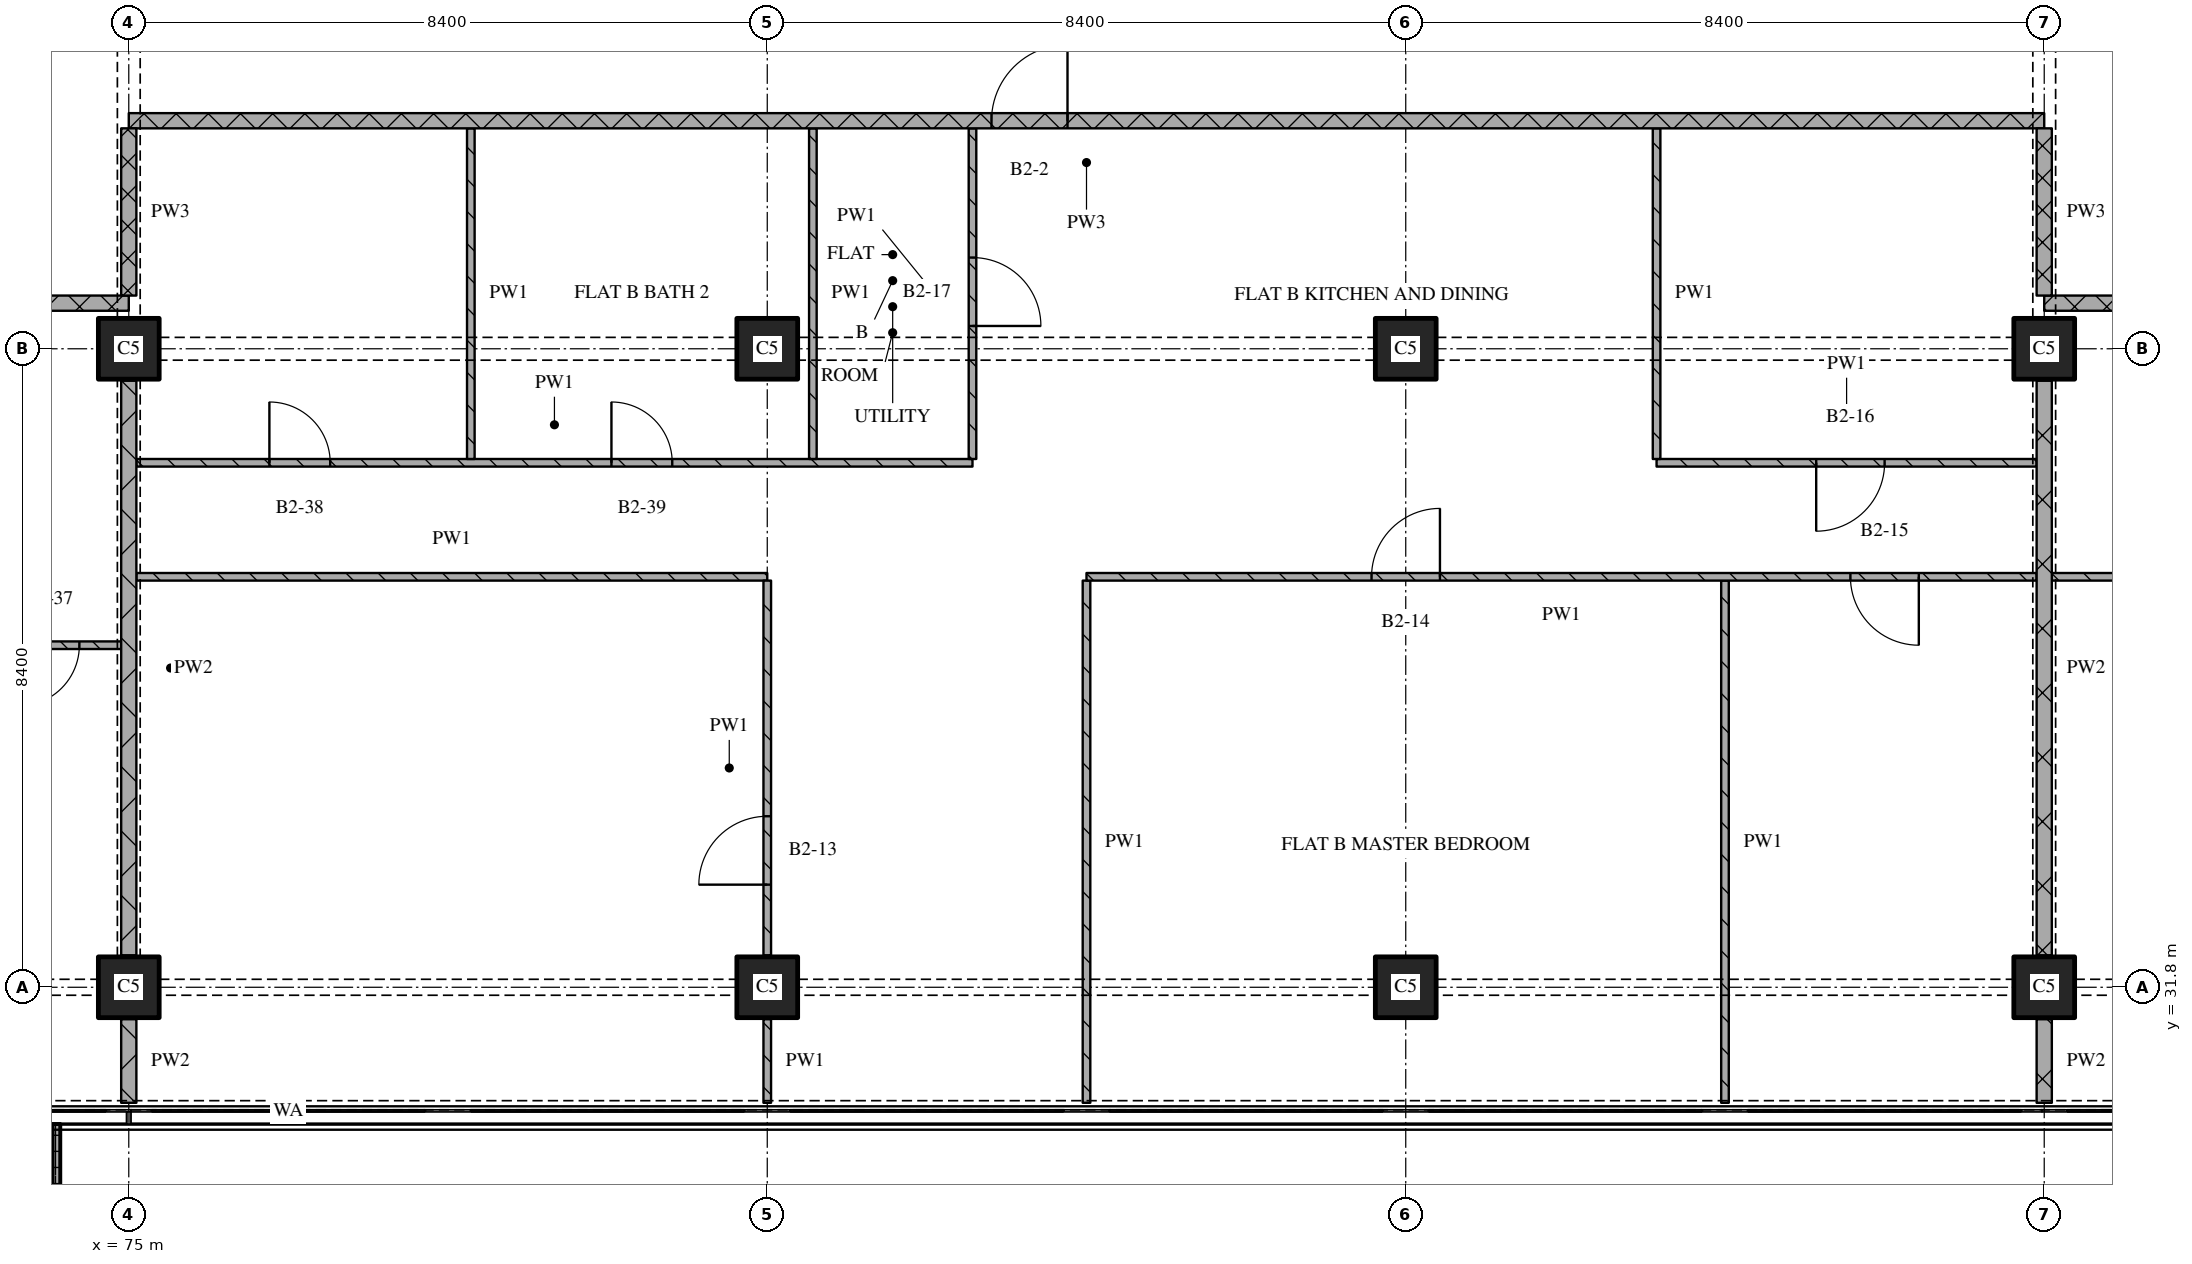
"""IFC4 building model, lengths in metres.
Left out: names, types, materials, properties, quantities, classifications, styles, units other than length and angle.
Written with IfcOpenShell. Run it as: python <this file> out.ifc"""

import sys

from ifc_helpers import new_model, si_unit, direction, frame, frame_2d, origin, origin_2d, place, context, subcontext, project, spatial, polyline, rectangle, outline, extrude, element, fill, save


model = new_model("IFC4")
c1 = context("Model", 3, precision=1e-05, world=origin(), true_north=direction((0.0, 1.0)))
c2 = subcontext(c1, "Body", "Model", "MODEL_VIEW")
j1 = project(units=[si_unit("LENGTHUNIT", "METRE"), si_unit("PLANEANGLEUNIT", "RADIAN")], contexts=[c1])
p1 = place(None, origin())
s1 = spatial("IfcSite", under=j1, at=p1, CompositionType="ELEMENT")
p2 = place(p1, origin())
s2 = spatial("IfcBuilding", under=s1, at=p2, CompositionType="ELEMENT")
p3 = place(p2, frame((0.0, 0.0, 109.65)))
s3 = spatial("IfcBuildingStorey", under=s2, at=p3, CompositionType="ELEMENT", Elevation=109.65)
for number, where, z_axis, x_axis in (
    (1, (75.0, 31.8, 0.0), (0.0, 0.0, 1.0), (1.0, 0.0, 0.0)),
    (2, (75.0, 40.2, 0.0), (0.0, 0.0, 1.0), (1.0, 0.0, 0.0)),
    (3, (83.4, 31.8, 0.0), (0.0, 0.0, 1.0), (1.0, 0.0, 0.0)),
    (4, (83.4, 40.2, 0.0), (0.0, 0.0, 1.0), (1.0, 0.0, 0.0)),
    (5, (91.8, 31.8, 0.0), (0.0, 0.0, 1.0), (1.0, 0.0, 0.0)),
    (6, (91.8, 40.2, 0.0), (0.0, 0.0, 1.0), (1.0, 0.0, 0.0)),
    (7, (100.2, 31.8, 0.0), (0.0, 0.0, 1.0), (1.0, 0.0, 0.0)),
    (8, (100.2, 40.2, 0.0), (0.0, 0.0, 1.0), (1.0, 0.0, 0.0)),
):
    element("IfcColumn", number, at=place(p3, frame(where, z_axis=z_axis, x_axis=x_axis)), inside=s3, PredefinedType="COLUMN", context=c2, shape_type="SweptSolid", body=[
        extrude(rectangle(XDim=0.8, YDim=0.8, at=origin_2d()), origin(), (0.0, 0.0, 1.0), 3.6),
    ])
p4 = place(p3, origin())
e9 = element("IfcWall", 9, at=p4, inside=s3, PredefinedType="SOLIDWALL", context=c2, shape_type="SweptSolid", body=[
    extrude(outline(polyline([(71.7, 30.0), (71.8, 30.0), (71.8, 28.5), (74.0, 28.5), (74.0, 30.0), (74.1, 30.0), (74.1, 28.4), (71.7, 28.4), (71.7, 30.0)])), origin(), (0.0, 0.0, 1.0), 1.0),
])
p5 = place(p3, frame((68.4, 36.3, 0.0), z_axis=(0.0, 0.0, 1.0), x_axis=(1.0, 0.0, 0.0)))
e10 = element("IfcWall", 10, at=p5, inside=s3, PredefinedType="PARTITIONING", context=c2, shape_type="SweptSolid", body=[
    extrude(rectangle(XDim=6.5, YDim=0.1, at=frame_2d((3.25, 0.0))), origin(), (0.0, 0.0, 1.0), 3.32),
])
p6 = place(p5, frame((5.15, 0.0, 0.0)))
e11 = element("IfcOpeningElement", 11, at=p6, cuts=e10, PredefinedType="OPENING", context=c2, shape_type="SweptSolid", body=[
    extrude(rectangle(XDim=0.8, YDim=2.1, at=frame_2d((0.4, 1.05))), frame((0.0, 0.06, 0.0), z_axis=(0.0, -1.0, 0.0), x_axis=(1.0, 0.0, 0.0)), (0.0, 0.0, 1.0), 0.12),
])
p7 = place(p3, frame((75.1, 37.2, 0.0), z_axis=(0.0, 0.0, 1.0), x_axis=(1.0, 0.0, 0.0)))
e12 = element("IfcWall", 12, at=p7, inside=s3, PredefinedType="PARTITIONING", context=c2, shape_type="SweptSolid", body=[
    extrude(rectangle(XDim=8.3, YDim=0.1, at=frame_2d((4.15, 0.0))), origin(), (0.0, 0.0, 1.0), 3.32),
])
p8 = place(p3, frame((75.1, 38.7, 0.0), z_axis=(0.0, 0.0, 1.0), x_axis=(1.0, 0.0, 0.0)))
e13 = element("IfcWall", 13, at=p8, inside=s3, PredefinedType="PARTITIONING", context=c2, shape_type="SweptSolid", body=[
    extrude(rectangle(XDim=11.0, YDim=0.1, at=frame_2d((5.5, 0.0))), origin(), (0.0, 0.0, 1.0), 3.32),
])
p9 = place(p8, frame((1.75, 0.0, 0.0)))
e14 = element("IfcOpeningElement", 14, at=p9, cuts=e13, PredefinedType="OPENING", context=c2, shape_type="SweptSolid", body=[
    extrude(rectangle(XDim=0.8, YDim=2.1, at=frame_2d((0.4, 1.05))), frame((0.0, 0.06, 0.0), z_axis=(0.0, -1.0, 0.0), x_axis=(1.0, 0.0, 0.0)), (0.0, 0.0, 1.0), 0.12),
])
p10 = place(p8, frame((6.25, 0.0, 0.0)))
e15 = element("IfcOpeningElement", 15, at=p10, cuts=e13, PredefinedType="OPENING", context=c2, shape_type="SweptSolid", body=[
    extrude(rectangle(XDim=0.8, YDim=2.1, at=frame_2d((0.4, 1.05))), frame((0.0, 0.06, 0.0), z_axis=(0.0, -1.0, 0.0), x_axis=(1.0, 0.0, 0.0)), (0.0, 0.0, 1.0), 0.12),
])
p11 = place(p3, frame((95.1, 38.7, 0.0), z_axis=(0.0, 0.0, 1.0), x_axis=(1.0, 0.0, 0.0)))
e16 = element("IfcWall", 16, at=p11, inside=s3, PredefinedType="PARTITIONING", context=c2, shape_type="SweptSolid", body=[
    extrude(rectangle(XDim=5.0, YDim=0.1, at=frame_2d((2.5, 0.0))), origin(), (0.0, 0.0, 1.0), 3.32),
])
p12 = place(p11, frame((2.1, 0.0, 0.0)))
e17 = element("IfcOpeningElement", 17, at=p12, cuts=e16, PredefinedType="OPENING", context=c2, shape_type="SweptSolid", body=[
    extrude(rectangle(XDim=0.9, YDim=2.1, at=frame_2d((0.45, 1.05))), frame((0.0, 0.06, 0.0), z_axis=(0.0, -1.0, 0.0), x_axis=(1.0, 0.0, 0.0)), (0.0, 0.0, 1.0), 0.12),
])
p13 = place(p3, frame((75.0, 40.8, 0.0), z_axis=(0.0, 0.0, 1.0), x_axis=(-1.0, 0.0, 0.0)))
e18 = element("IfcWall", 18, at=p13, inside=s3, PredefinedType="PARTITIONING", context=c2, shape_type="SweptSolid", body=[
    extrude(rectangle(XDim=24.18, YDim=0.2, at=frame_2d((12.09, 0.0))), origin(), (0.0, 0.0, 1.0), 3.32),
])
p14 = place(p13, frame((6.85, 0.0, 0.0)))
e19 = element("IfcOpeningElement", 19, at=p14, cuts=e18, PredefinedType="OPENING", context=c2, shape_type="SweptSolid", body=[
    extrude(rectangle(XDim=1.0, YDim=2.1, at=frame_2d((0.5, 1.05))), frame((0.0, 0.11, 0.0), z_axis=(0.0, -1.0, 0.0), x_axis=(1.0, 0.0, 0.0)), (0.0, 0.0, 1.0), 0.22),
])
p15 = place(p3, frame((124.38, 40.8, 0.0), z_axis=(0.0, 0.0, 1.0), x_axis=(-1.0, 0.0, 0.0)))
e20 = element("IfcWall", 20, at=p15, inside=s3, PredefinedType="PARTITIONING", context=c2, shape_type="SweptSolid", body=[
    extrude(rectangle(XDim=24.18, YDim=0.2, at=frame_2d((12.09, 0.0))), origin(), (0.0, 0.0, 1.0), 3.32),
])
p16 = place(p15, frame((12.13, 0.0, 0.0)))
e21 = element("IfcOpeningElement", 21, at=p16, cuts=e20, PredefinedType="OPENING", context=c2, shape_type="SweptSolid", body=[
    extrude(rectangle(XDim=1.0, YDim=2.1, at=frame_2d((0.5, 1.05))), frame((0.0, 0.11, 0.0), z_axis=(0.0, -1.0, 0.0), x_axis=(1.0, 0.0, 0.0)), (0.0, 0.0, 1.0), 0.22),
])
p17 = place(p3, frame((100.2, 43.2, 0.0), z_axis=(0.0, 0.0, 1.0), x_axis=(-1.0, 0.0, 0.0)))
e22 = element("IfcWall", 22, at=p17, inside=s3, PredefinedType="PARTITIONING", context=c2, shape_type="SweptSolid", body=[
    extrude(rectangle(XDim=25.2, YDim=0.2, at=frame_2d((12.6, 0.0))), origin(), (0.0, 0.0, 1.0), 3.32),
])
p18 = place(p17, frame((12.85, 0.0, 0.0)))
e23 = element("IfcOpeningElement", 23, at=p18, cuts=e22, PredefinedType="OPENING", context=c2, shape_type="SweptSolid", body=[
    extrude(rectangle(XDim=1.0, YDim=2.1, at=frame_2d((0.5, 1.05))), frame((0.0, 0.11, 0.0), z_axis=(0.0, -1.0, 0.0), x_axis=(1.0, 0.0, 0.0)), (0.0, 0.0, 1.0), 0.22),
])
p19 = place(p3, frame((75.0, 43.1, 0.0), z_axis=(0.0, 0.0, 1.0), x_axis=(0.0, -1.0, 0.0)))
e24 = element("IfcWall", 24, at=p19, inside=s3, PredefinedType="PARTITIONING", context=c2, shape_type="SweptSolid", body=[
    extrude(rectangle(XDim=2.2, YDim=0.2, at=frame_2d((1.1, 0.0))), origin(), (0.0, 0.0, 1.0), 2.43),
])
p20 = place(p3, frame((75.0, 31.38, 0.0), z_axis=(0.0, 0.0, 1.0), x_axis=(0.0, -1.0, 0.0)))
e25 = element("IfcWall", 25, at=p20, inside=s3, PredefinedType="PARTITIONING", context=c2, shape_type="SweptSolid", body=[
    extrude(rectangle(XDim=1.1, YDim=0.2, at=frame_2d((0.55, 0.0))), origin(), (0.0, 0.0, 1.0), 3.32),
])
p21 = place(p3, frame((75.0, 39.78, 0.0), z_axis=(0.0, 0.0, 1.0), x_axis=(0.0, -1.0, 0.0)))
e26 = element("IfcWall", 26, at=p21, inside=s3, PredefinedType="PARTITIONING", context=c2, shape_type="SweptSolid", body=[
    extrude(rectangle(XDim=7.56, YDim=0.2, at=frame_2d((3.78, 0.0))), origin(), (0.0, 0.0, 1.0), 2.83),
])
p22 = place(p3, frame((79.5, 43.1, 0.0), z_axis=(0.0, 0.0, 1.0), x_axis=(0.0, -1.0, 0.0)))
e27 = element("IfcWall", 27, at=p22, inside=s3, PredefinedType="PARTITIONING", context=c2, shape_type="SweptSolid", body=[
    extrude(rectangle(XDim=4.35, YDim=0.1, at=frame_2d((2.175, 0.0))), origin(), (0.0, 0.0, 1.0), 3.32),
])
p23 = place(p3, frame((83.4, 31.38, 0.0), z_axis=(0.0, 0.0, 1.0), x_axis=(0.0, -1.0, 0.0)))
e28 = element("IfcWall", 28, at=p23, inside=s3, PredefinedType="PARTITIONING", context=c2, shape_type="SweptSolid", body=[
    extrude(rectangle(XDim=1.1, YDim=0.1, at=frame_2d((0.55, 0.0))), origin(), (0.0, 0.0, 1.0), 3.32),
])
p24 = place(p3, frame((83.4, 32.22, 0.0), z_axis=(0.0, 0.0, 1.0), x_axis=(0.0, 1.0, 0.0)))
e29 = element("IfcWall", 29, at=p24, inside=s3, PredefinedType="PARTITIONING", context=c2, shape_type="SweptSolid", body=[
    extrude(rectangle(XDim=4.93, YDim=0.1, at=frame_2d((2.465, 0.0))), origin(), (0.0, 0.0, 1.0), 3.32),
])
p25 = place(p24, frame((0.93, 0.0, 0.0)))
e30 = element("IfcOpeningElement", 30, at=p25, cuts=e29, PredefinedType="OPENING", context=c2, shape_type="SweptSolid", body=[
    extrude(rectangle(XDim=0.9, YDim=2.1, at=frame_2d((0.45, 1.05))), frame((0.0, 0.06, 0.0), z_axis=(0.0, -1.0, 0.0), x_axis=(1.0, 0.0, 0.0)), (0.0, 0.0, 1.0), 0.12),
])
p26 = place(p3, frame((84.0, 43.1, 0.0), z_axis=(0.0, 0.0, 1.0), x_axis=(0.0, -1.0, 0.0)))
e31 = element("IfcWall", 31, at=p26, inside=s3, PredefinedType="PARTITIONING", context=c2, shape_type="SweptSolid", body=[
    extrude(rectangle(XDim=4.35, YDim=0.1, at=frame_2d((2.175, 0.0))), origin(), (0.0, 0.0, 1.0), 3.32),
])
p27 = place(p3, frame((86.1, 38.75, 0.0), z_axis=(0.0, 0.0, 1.0), x_axis=(0.0, 1.0, 0.0)))
e32 = element("IfcWall", 32, at=p27, inside=s3, PredefinedType="PARTITIONING", context=c2, shape_type="SweptSolid", body=[
    extrude(rectangle(XDim=4.35, YDim=0.1, at=frame_2d((2.175, 0.0))), origin(), (0.0, 0.0, 1.0), 3.32),
])
p28 = place(p27, frame((1.75, 0.0, 0.0)))
e33 = element("IfcOpeningElement", 33, at=p28, cuts=e32, PredefinedType="OPENING", context=c2, shape_type="SweptSolid", body=[
    extrude(rectangle(XDim=0.9, YDim=2.1, at=frame_2d((0.45, 1.05))), frame((0.0, 0.06, 0.0), z_axis=(0.0, -1.0, 0.0), x_axis=(1.0, 0.0, 0.0)), (0.0, 0.0, 1.0), 0.12),
])
p29 = place(p3, frame((87.6, 37.15, 0.0), z_axis=(0.0, 0.0, 1.0), x_axis=(0.0, -1.0, 0.0)))
e34 = element("IfcWall", 34, at=p29, inside=s3, PredefinedType="PARTITIONING", context=c2, shape_type="SweptSolid", body=[
    extrude(rectangle(XDim=6.87, YDim=0.1, at=frame_2d((3.435, 0.0))), origin(), (0.0, 0.0, 1.0), 3.32),
])
p30 = place(p3, frame((95.1, 43.1, 0.0), z_axis=(0.0, 0.0, 1.0), x_axis=(0.0, -1.0, 0.0)))
e35 = element("IfcWall", 35, at=p30, inside=s3, PredefinedType="PARTITIONING", context=c2, shape_type="SweptSolid", body=[
    extrude(rectangle(XDim=4.35, YDim=0.1, at=frame_2d((2.175, 0.0))), origin(), (0.0, 0.0, 1.0), 3.32),
])
p31 = place(p3, frame((96.0, 37.15, 0.0), z_axis=(0.0, 0.0, 1.0), x_axis=(0.0, -1.0, 0.0)))
e36 = element("IfcWall", 36, at=p31, inside=s3, PredefinedType="PARTITIONING", context=c2, shape_type="SweptSolid", body=[
    extrude(rectangle(XDim=6.87, YDim=0.1, at=frame_2d((3.435, 0.0))), origin(), (0.0, 0.0, 1.0), 3.32),
])
p32 = place(p3, frame((100.2, 43.1, 0.0), z_axis=(0.0, 0.0, 1.0), x_axis=(0.0, -1.0, 0.0)))
e37 = element("IfcWall", 37, at=p32, inside=s3, PredefinedType="PARTITIONING", context=c2, shape_type="SweptSolid", body=[
    extrude(rectangle(XDim=2.2, YDim=0.2, at=frame_2d((1.1, 0.0))), origin(), (0.0, 0.0, 1.0), 2.43),
])
p33 = place(p3, frame((100.2, 31.38, 0.0), z_axis=(0.0, 0.0, 1.0), x_axis=(0.0, -1.0, 0.0)))
e38 = element("IfcWall", 38, at=p33, inside=s3, PredefinedType="PARTITIONING", context=c2, shape_type="SweptSolid", body=[
    extrude(rectangle(XDim=1.1, YDim=0.2, at=frame_2d((0.55, 0.0))), origin(), (0.0, 0.0, 1.0), 3.32),
])
p34 = place(p3, frame((100.2, 39.78, 0.0), z_axis=(0.0, 0.0, 1.0), x_axis=(0.0, -1.0, 0.0)))
e39 = element("IfcWall", 39, at=p34, inside=s3, PredefinedType="PARTITIONING", context=c2, shape_type="SweptSolid", body=[
    extrude(rectangle(XDim=7.56, YDim=0.2, at=frame_2d((3.78, 0.0))), origin(), (0.0, 0.0, 1.0), 2.83),
])
p35 = place(p3, frame((100.1, 37.2, 0.0), z_axis=(0.0, 0.0, 1.0), x_axis=(-1.0, 0.0, 0.0)))
e40 = element("IfcWall", 40, at=p35, inside=s3, PredefinedType="PARTITIONING", context=c2, shape_type="SweptSolid", body=[
    extrude(rectangle(XDim=12.5, YDim=0.1, at=frame_2d((6.25, 0.0))), origin(), (0.0, 0.0, 1.0), 3.32),
])
p36 = place(p35, frame((1.55, 0.0, 0.0)))
e41 = element("IfcOpeningElement", 41, at=p36, cuts=e40, PredefinedType="OPENING", context=c2, shape_type="SweptSolid", body=[
    extrude(rectangle(XDim=0.9, YDim=2.1, at=frame_2d((0.45, 1.05))), frame((0.0, 0.06, 0.0), z_axis=(0.0, -1.0, 0.0), x_axis=(1.0, 0.0, 0.0)), (0.0, 0.0, 1.0), 0.12),
])
p37 = place(p35, frame((7.85, 0.0, 0.0)))
e42 = element("IfcOpeningElement", 42, at=p37, cuts=e40, PredefinedType="OPENING", context=c2, shape_type="SweptSolid", body=[
    extrude(rectangle(XDim=0.9, YDim=2.1, at=frame_2d((0.45, 1.05))), frame((0.0, 0.06, 0.0), z_axis=(0.0, -1.0, 0.0), x_axis=(1.0, 0.0, 0.0)), (0.0, 0.0, 1.0), 0.12),
])
p38 = place(p3, frame((100.3, 37.2, 0.0), z_axis=(0.0, 0.0, 1.0), x_axis=(1.0, 0.0, 0.0)))
e43 = element("IfcWall", 43, at=p38, inside=s3, PredefinedType="PARTITIONING", context=c2, shape_type="SweptSolid", body=[
    extrude(rectangle(XDim=10.7, YDim=0.1, at=frame_2d((5.35, 0.0))), origin(), (0.0, 0.0, 1.0), 3.32),
])
p39 = place(p38, frame((1.75, 0.0, 0.0)))
e44 = element("IfcOpeningElement", 44, at=p39, cuts=e43, PredefinedType="OPENING", context=c2, shape_type="SweptSolid", body=[
    extrude(rectangle(XDim=0.8, YDim=2.1, at=frame_2d((0.4, 1.05))), frame((0.0, 0.06, 0.0), z_axis=(0.0, -1.0, 0.0), x_axis=(1.0, 0.0, 0.0)), (0.0, 0.0, 1.0), 0.12),
])
p40 = place(p38, frame((6.25, 0.0, 0.0)))
e45 = element("IfcOpeningElement", 45, at=p40, cuts=e43, PredefinedType="OPENING", context=c2, shape_type="SweptSolid", body=[
    extrude(rectangle(XDim=0.8, YDim=2.1, at=frame_2d((0.4, 1.05))), frame((0.0, 0.06, 0.0), z_axis=(0.0, -1.0, 0.0), x_axis=(1.0, 0.0, 0.0)), (0.0, 0.0, 1.0), 0.12),
])
p41 = place(p38, frame((9.35, 0.0, 0.0)))
e46 = element("IfcOpeningElement", 46, at=p41, cuts=e43, PredefinedType="OPENING", context=c2, shape_type="SweptSolid", body=[
    extrude(rectangle(XDim=0.9, YDim=2.1, at=frame_2d((0.45, 1.05))), frame((0.0, 0.06, 0.0), z_axis=(0.0, -1.0, 0.0), x_axis=(1.0, 0.0, 0.0)), (0.0, 0.0, 1.0), 0.12),
])
p42 = place(p6, origin())
e47 = element("IfcDoor", 47, at=p42, inside=s3, OperationType="SINGLE_SWING_RIGHT", PredefinedType="DOOR", context=c2, shape_type="SweptSolid", body=[
    extrude(rectangle(XDim=0.8, YDim=2.1, at=frame_2d((0.4, 1.05))), frame((0.0, 0.025, 0.0), z_axis=(0.0, -1.0, 0.0), x_axis=(1.0, 0.0, 0.0)), (0.0, 0.0, 1.0), 0.05),
])
fill(e11, e47)
p43 = place(p9, origin())
e48 = element("IfcDoor", 48, at=p43, inside=s3, OperationType="SINGLE_SWING_LEFT", PredefinedType="DOOR", context=c2, shape_type="SweptSolid", body=[
    extrude(rectangle(XDim=0.8, YDim=2.1, at=frame_2d((0.4, 1.05))), frame((0.0, 0.025, 0.0), z_axis=(0.0, -1.0, 0.0), x_axis=(1.0, 0.0, 0.0)), (0.0, 0.0, 1.0), 0.05),
])
fill(e14, e48)
p44 = place(p10, origin())
e49 = element("IfcDoor", 49, at=p44, inside=s3, OperationType="SINGLE_SWING_LEFT", PredefinedType="DOOR", context=c2, shape_type="SweptSolid", body=[
    extrude(rectangle(XDim=0.8, YDim=2.1, at=frame_2d((0.4, 1.05))), frame((0.0, 0.025, 0.0), z_axis=(0.0, -1.0, 0.0), x_axis=(1.0, 0.0, 0.0)), (0.0, 0.0, 1.0), 0.05),
])
fill(e15, e49)
p45 = place(p12, origin())
e50 = element("IfcDoor", 50, at=p45, inside=s3, OperationType="SINGLE_SWING_RIGHT", PredefinedType="DOOR", context=c2, shape_type="SweptSolid", body=[
    extrude(rectangle(XDim=0.9, YDim=2.1, at=frame_2d((0.45, 1.05))), frame((0.0, 0.025, 0.0), z_axis=(0.0, -1.0, 0.0), x_axis=(1.0, 0.0, 0.0)), (0.0, 0.0, 1.0), 0.05),
])
fill(e17, e50)
p46 = place(p18, origin())
e51 = element("IfcDoor", 51, at=p46, inside=s3, OperationType="SINGLE_SWING_RIGHT", PredefinedType="DOOR", context=c2, shape_type="SweptSolid", body=[
    extrude(rectangle(XDim=1.0, YDim=2.1, at=frame_2d((0.5, 1.05))), frame((0.0, 0.025, 0.0), z_axis=(0.0, -1.0, 0.0), x_axis=(1.0, 0.0, 0.0)), (0.0, 0.0, 1.0), 0.05),
])
fill(e23, e51)
p47 = place(p25, origin())
e52 = element("IfcDoor", 52, at=p47, inside=s3, OperationType="SINGLE_SWING_LEFT", PredefinedType="DOOR", context=c2, shape_type="SweptSolid", body=[
    extrude(rectangle(XDim=0.9, YDim=2.1, at=frame_2d((0.45, 1.05))), frame((0.0, 0.025, 0.0), z_axis=(0.0, -1.0, 0.0), x_axis=(1.0, 0.0, 0.0)), (0.0, 0.0, 1.0), 0.05),
])
fill(e30, e52)
p48 = place(p28, origin())
e53 = element("IfcDoor", 53, at=p48, inside=s3, OperationType="SINGLE_SWING_RIGHT", PredefinedType="DOOR", context=c2, shape_type="SweptSolid", body=[
    extrude(rectangle(XDim=0.9, YDim=2.1, at=frame_2d((0.45, 1.05))), frame((0.0, 0.025, 0.0), z_axis=(0.0, -1.0, 0.0), x_axis=(1.0, 0.0, 0.0)), (0.0, 0.0, 1.0), 0.05),
])
fill(e33, e53)
p49 = place(p36, origin())
e54 = element("IfcDoor", 54, at=p49, inside=s3, OperationType="SINGLE_SWING_LEFT", PredefinedType="DOOR", context=c2, shape_type="SweptSolid", body=[
    extrude(rectangle(XDim=0.9, YDim=2.1, at=frame_2d((0.45, 1.05))), frame((0.0, 0.025, 0.0), z_axis=(0.0, -1.0, 0.0), x_axis=(1.0, 0.0, 0.0)), (0.0, 0.0, 1.0), 0.05),
])
fill(e41, e54)
p50 = place(p37, origin())
e55 = element("IfcDoor", 55, at=p50, inside=s3, OperationType="SINGLE_SWING_RIGHT", PredefinedType="DOOR", context=c2, shape_type="SweptSolid", body=[
    extrude(rectangle(XDim=0.9, YDim=2.1, at=frame_2d((0.45, 1.05))), frame((0.0, 0.025, 0.0), z_axis=(0.0, -1.0, 0.0), x_axis=(1.0, 0.0, 0.0)), (0.0, 0.0, 1.0), 0.05),
])
fill(e42, e55)
save(model, sys.argv[1])
